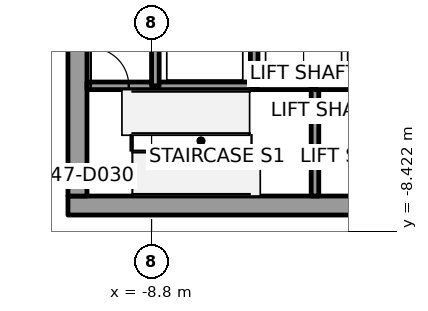
"""IFC4 building model, lengths in metres.
Left out: names, types, materials, properties, quantities, classifications, styles, units other than length and angle.
Written with IfcOpenShell. Run it as: python <this file> out.ifc"""

import sys

from ifc_helpers import new_model, si_unit, direction, frame, frame_2d, origin, place, context, subcontext, project, spatial, rectangle, extrude, element, fill, save


model = new_model("IFC4")
c1 = context("Model", 3, precision=1e-05, world=origin(), true_north=direction((0.0, 1.0)))
c2 = subcontext(c1, "Body", "Model", "MODEL_VIEW")
j1 = project(units=[si_unit("LENGTHUNIT", "METRE"), si_unit("PLANEANGLEUNIT", "RADIAN")], contexts=[c1])
p1 = place(None, origin())
s1 = spatial("IfcSite", under=j1, at=p1, CompositionType="ELEMENT")
p2 = place(p1, origin())
s2 = spatial("IfcBuilding", under=s1, at=p2, CompositionType="ELEMENT")
p3 = place(p2, frame((0.0, 0.0, 209.8)))
s3 = spatial("IfcBuildingStorey", under=s2, at=p3, CompositionType="ELEMENT", Elevation=209.8)
p4 = place(p3, frame((-11.0, -7.75, 0.0), z_axis=(0.0, 0.0, 1.0), x_axis=(1.0, 0.0, 0.0)))
e1 = element("IfcWall", 1, at=p4, inside=s3, PredefinedType="SHEAR", context=c2, shape_type="SweptSolid", body=[
    extrude(rectangle(XDim=22.0, YDim=0.5, at=frame_2d((11.0, 0.0))), origin(), (0.0, 0.0, 1.0), 4.0),
])
p5 = place(p4, frame((10.45, 0.0, 0.0)))
e2 = element("IfcOpeningElement", 2, at=p5, cuts=e1, PredefinedType="OPENING", context=c2, shape_type="SweptSolid", body=[
    extrude(rectangle(XDim=1.1, YDim=2.1, at=frame_2d((0.55, 1.05))), frame((0.0, 0.25, 0.0), z_axis=(0.0, -1.0, 0.0), x_axis=(1.0, 0.0, 0.0)), (0.0, 0.0, 1.0), 0.5),
])
p6 = place(p3, frame((-10.75, -7.5, 0.0), z_axis=(0.0, 0.0, 1.0), x_axis=(0.0, 1.0, 0.0)))
e3 = element("IfcWall", 3, at=p6, inside=s3, PredefinedType="SHEAR", context=c2, shape_type="SweptSolid", body=[
    extrude(rectangle(XDim=15.0, YDim=0.5, at=frame_2d((7.5, 0.0))), origin(), (0.0, 0.0, 1.0), 4.0),
])
p7 = place(p6, frame((6.6, 0.0, 0.0)))
e4 = element("IfcOpeningElement", 4, at=p7, cuts=e3, PredefinedType="OPENING", context=c2, shape_type="SweptSolid", body=[
    extrude(rectangle(XDim=1.8, YDim=2.1, at=frame_2d((0.9, 1.05))), frame((0.0, 0.25, 0.0), z_axis=(0.0, -1.0, 0.0), x_axis=(1.0, 0.0, 0.0)), (0.0, 0.0, 1.0), 0.5),
])
p8 = place(p3, frame((-10.5, -4.6, 0.0), z_axis=(0.0, 0.0, 1.0), x_axis=(1.0, 0.0, 0.0)))
e5 = element("IfcWall", 5, at=p8, inside=s3, PredefinedType="SOLIDWALL", context=c2, shape_type="SweptSolid", body=[
    extrude(rectangle(XDim=1.8, YDim=0.2, at=frame_2d((0.9, 0.0))), origin(), (0.0, 0.0, 1.0), 3.85),
])
p9 = place(p8, frame((0.1, 0.0, 0.0)))
e6 = element("IfcOpeningElement", 6, at=p9, cuts=e5, PredefinedType="OPENING", context=c2, shape_type="SweptSolid", body=[
    extrude(rectangle(XDim=1.0, YDim=2.1, at=frame_2d((0.5, 1.05))), frame((0.0, 0.1, 0.0), z_axis=(0.0, -1.0, 0.0), x_axis=(1.0, 0.0, 0.0)), (0.0, 0.0, 1.0), 0.2),
])
p10 = place(p3, frame((-8.7, -4.6, 0.0), z_axis=(0.0, 0.0, 1.0), x_axis=(1.0, 0.0, 0.0)))
e7 = element("IfcWall", 7, at=p10, inside=s3, PredefinedType="SOLIDWALL", context=c2, shape_type="SweptSolid", body=[
    extrude(rectangle(XDim=2.6, YDim=0.2, at=frame_2d((1.3, 0.0))), origin(), (0.0, 0.0, 1.0), 3.85),
])
p11 = place(p3, frame((-8.7, -4.6, 0.0), z_axis=(0.0, 0.0, 1.0), x_axis=(0.0, 1.0, 0.0)))
e8 = element("IfcWall", 8, at=p11, inside=s3, PredefinedType="SOLIDWALL", context=c2, shape_type="SweptSolid", body=[
    extrude(rectangle(XDim=2.8, YDim=0.2, at=frame_2d((1.4, 0.0))), origin(), (0.0, 0.0, 1.0), 3.85),
])
p12 = place(p3, frame((-6.1, -4.6, 0.0), z_axis=(0.0, 0.0, 1.0), x_axis=(1.0, 0.0, 0.0)))
e9 = element("IfcWall", 9, at=p12, inside=s3, PredefinedType="SOLIDWALL", context=c2, shape_type="SweptSolid", body=[
    extrude(rectangle(XDim=1.6, YDim=0.2, at=frame_2d((0.8, 0.0))), origin(), (0.0, 0.0, 1.0), 3.85),
])
p13 = place(p3, frame((-6.1, -4.6, 0.0), z_axis=(0.0, 0.0, 1.0), x_axis=(0.0, 1.0, 0.0)))
e10 = element("IfcWall", 10, at=p13, inside=s3, PredefinedType="SOLIDWALL", context=c2, shape_type="SweptSolid", body=[
    extrude(rectangle(XDim=2.8, YDim=0.2, at=frame_2d((1.4, 0.0))), origin(), (0.0, 0.0, 1.0), 3.85),
])
p14 = place(p3, frame((-4.5, -4.6, 0.0), z_axis=(0.0, 0.0, 1.0), x_axis=(0.0, -1.0, 0.0)))
e11 = element("IfcWall", 11, at=p14, inside=s3, PredefinedType="SOLIDWALL", context=c2, shape_type="SweptSolid", body=[
    extrude(rectangle(XDim=2.9, YDim=0.2, at=frame_2d((1.45, 0.0))), origin(), (0.0, 0.0, 1.0), 3.85),
])
p15 = place(p3, frame((-4.5, -4.6, 0.0), z_axis=(0.0, 0.0, 1.0), x_axis=(1.0, 0.0, 0.0)))
e12 = element("IfcWall", 12, at=p15, inside=s3, PredefinedType="SOLIDWALL", context=c2, shape_type="SweptSolid", body=[
    extrude(rectangle(XDim=1.0, YDim=0.2, at=frame_2d((0.5, 0.0))), origin(), (0.0, 0.0, 1.0), 3.85),
])
p16 = place(p9, origin())
e13 = element("IfcDoor", 13, at=p16, inside=s3, OperationType="SINGLE_SWING_LEFT", PredefinedType="DOOR", context=c2, shape_type="SweptSolid", body=[
    extrude(rectangle(XDim=1.0, YDim=2.1, at=frame_2d((0.5, 1.05))), frame((0.0, 0.025, 0.0), z_axis=(0.0, -1.0, 0.0), x_axis=(1.0, 0.0, 0.0)), (0.0, 0.0, 1.0), 0.05),
])
fill(e6, e13)
save(model, sys.argv[1])
